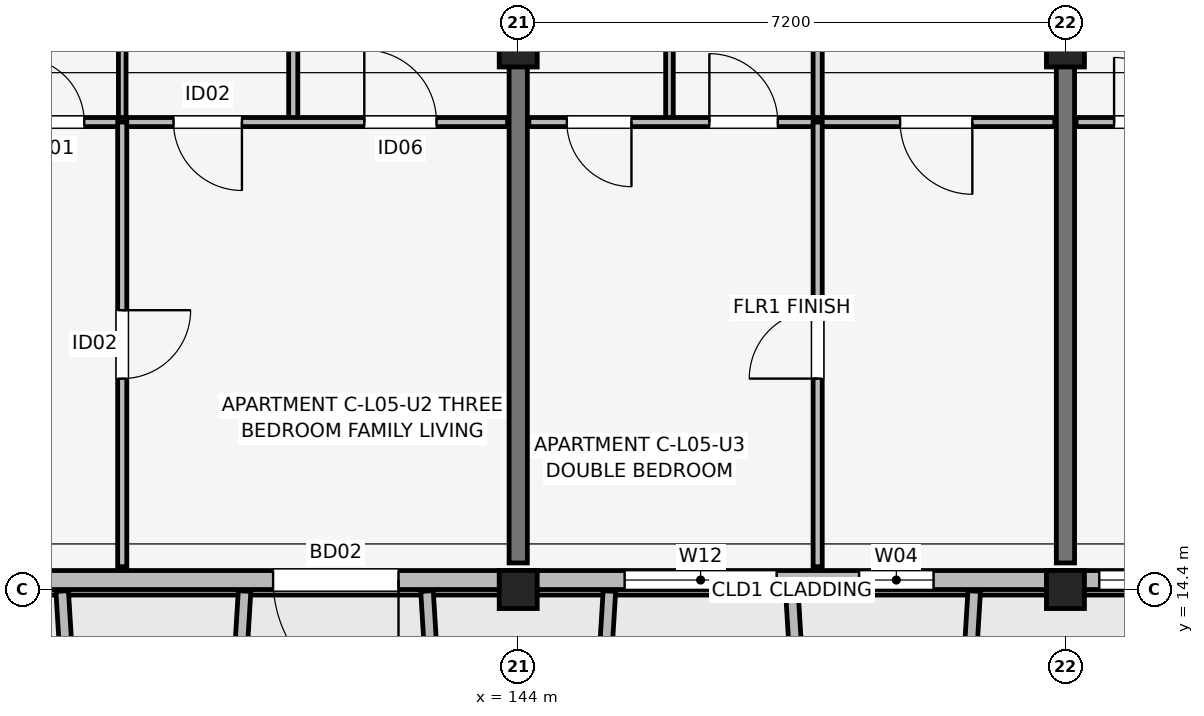
"""IFC4 building model, lengths in metres.
Left out: names, types, materials, properties, quantities, classifications, styles, units other than length and angle.
Written with IfcOpenShell. Run it as: python <this file> out.ifc"""

import sys

from ifc_helpers import new_model, si_unit, direction, frame, frame_2d, origin, origin_2d, place, context, subcontext, project, spatial, rectangle, extrude, element, fill, save


model = new_model("IFC4")
c1 = context("Model", 3, precision=1e-05, world=origin(), true_north=direction((0.0, 1.0)))
c2 = subcontext(c1, "Body", "Model", "MODEL_VIEW")
j1 = project(units=[si_unit("LENGTHUNIT", "METRE"), si_unit("PLANEANGLEUNIT", "RADIAN")], contexts=[c1])
p1 = place(None, origin())
s1 = spatial("IfcSite", under=j1, at=p1, CompositionType="ELEMENT")
p2 = place(p1, origin())
s2 = spatial("IfcBuilding", under=s1, at=p2, CompositionType="ELEMENT")
p3 = place(p2, frame((0.0, 0.0, 18.15)))
s3 = spatial("IfcBuildingStorey", under=s2, at=p3, CompositionType="ELEMENT", Elevation=18.15)
p4 = place(p3, frame((144.0, 14.4, 0.0), z_axis=(0.0, 0.0, 1.0), x_axis=(1.0, 0.0, 0.0)))
e1 = element("IfcColumn", 1, at=p4, inside=s3, PredefinedType="COLUMN", context=c2, shape_type="SweptSolid", body=[
    extrude(rectangle(XDim=0.5, YDim=0.5, at=origin_2d()), origin(), (0.0, 0.0, 1.0), 3.15),
])
p5 = place(p3, frame((144.0, 21.6, 0.0), z_axis=(0.0, 0.0, 1.0), x_axis=(1.0, 0.0, 0.0)))
e2 = element("IfcColumn", 2, at=p5, inside=s3, PredefinedType="COLUMN", context=c2, shape_type="SweptSolid", body=[
    extrude(rectangle(XDim=0.5, YDim=0.65, at=origin_2d()), origin(), (0.0, 0.0, 1.0), 3.15),
])
p6 = place(p3, frame((151.2, 14.4, 0.0), z_axis=(0.0, 0.0, 1.0), x_axis=(1.0, 0.0, 0.0)))
e3 = element("IfcColumn", 3, at=p6, inside=s3, PredefinedType="COLUMN", context=c2, shape_type="SweptSolid", body=[
    extrude(rectangle(XDim=0.5, YDim=0.5, at=origin_2d()), origin(), (0.0, 0.0, 1.0), 3.15),
])
p7 = place(p3, frame((151.2, 21.6, 0.0), z_axis=(0.0, 0.0, 1.0), x_axis=(1.0, 0.0, 0.0)))
e4 = element("IfcColumn", 4, at=p7, inside=s3, PredefinedType="COLUMN", context=c2, shape_type="SweptSolid", body=[
    extrude(rectangle(XDim=0.5, YDim=0.65, at=origin_2d()), origin(), (0.0, 0.0, 1.0), 3.15),
])
for number, where, z_axis, x_axis in (
    (5, (144.0, 14.75, 0.0), (0.0, 0.0, 1.0), (0.0, 1.0, 0.0)),
    (6, (151.2, 14.75, 0.0), (0.0, 0.0, 1.0), (0.0, 1.0, 0.0)),
):
    element("IfcWall", number, at=place(p3, frame(where, z_axis=z_axis, x_axis=x_axis)), inside=s3, PredefinedType="SHEAR", context=c2, shape_type="SweptSolid", body=[
        extrude(rectangle(XDim=9.4, YDim=0.24, at=frame_2d((4.7, 0.0))), origin(), (0.0, 0.0, 1.0), 3.15),
    ])
p8 = place(p3, frame((132.6, 14.525, 0.0), z_axis=(0.0, 0.0, 1.0), x_axis=(1.0, 0.0, 0.0)))
e7 = element("IfcWall", 7, at=p8, inside=s3, PredefinedType="SOLIDWALL", context=c2, shape_type="SweptSolid", body=[
    extrude(rectangle(XDim=30.0, YDim=0.25, at=frame_2d((15.0, 0.0))), origin(), (0.0, 0.0, 1.0), 2.43),
])
p9 = place(p8, frame((9.825, 0.0, 0.0), z_axis=(0.0, 0.0, 1.0), x_axis=(-1.0, 0.0, 0.0)))
e8 = element("IfcOpeningElement", 8, at=p9, cuts=e7, PredefinedType="OPENING", context=c2, shape_type="SweptSolid", body=[
    extrude(rectangle(XDim=1.65, YDim=2.15, at=frame_2d((0.825, 1.075))), frame((0.0, 0.135, 0.0), z_axis=(0.0, -1.0, 0.0), x_axis=(1.0, 0.0, 0.0)), (0.0, 0.0, 1.0), 0.27),
])
p10 = place(p8, frame((24.15, 0.0, 0.0), z_axis=(0.0, 0.0, 1.0), x_axis=(-1.0, 0.0, 0.0)))
e9 = element("IfcOpeningElement", 9, at=p10, cuts=e7, PredefinedType="OPENING", context=c2, shape_type="SweptSolid", body=[
    extrude(rectangle(XDim=1.5, YDim=2.15, at=frame_2d((0.75, 1.075))), frame((0.0, 0.135, 0.0), z_axis=(0.0, -1.0, 0.0), x_axis=(1.0, 0.0, 0.0)), (0.0, 0.0, 1.0), 0.27),
])
p11 = place(p8, frame((0.77, 0.0, 0.7)))
e10 = element("IfcOpeningElement", 10, at=p11, cuts=e7, PredefinedType="OPENING", context=c2, shape_type="SweptSolid", body=[
    extrude(rectangle(XDim=1.46, YDim=1.55, at=frame_2d((0.73, 0.775))), frame((0.0, 0.135, 0.0), z_axis=(0.0, -1.0, 0.0), x_axis=(1.0, 0.0, 0.0)), (0.0, 0.0, 1.0), 0.27),
])
p12 = place(p8, frame((3.155, 0.0, 0.75)))
e11 = element("IfcOpeningElement", 11, at=p12, cuts=e7, PredefinedType="OPENING", context=c2, shape_type="SweptSolid", body=[
    extrude(rectangle(XDim=0.6, YDim=1.25, at=frame_2d((0.3, 0.625))), frame((0.0, 0.135, 0.0), z_axis=(0.0, -1.0, 0.0), x_axis=(1.0, 0.0, 0.0)), (0.0, 0.0, 1.0), 0.27),
])
p13 = place(p8, frame((4.645, 0.0, 0.75)))
e12 = element("IfcOpeningElement", 12, at=p13, cuts=e7, PredefinedType="OPENING", context=c2, shape_type="SweptSolid", body=[
    extrude(rectangle(XDim=0.6, YDim=1.25, at=frame_2d((0.3, 0.625))), frame((0.0, 0.135, 0.0), z_axis=(0.0, -1.0, 0.0), x_axis=(1.0, 0.0, 0.0)), (0.0, 0.0, 1.0), 0.27),
])
p14 = place(p8, frame((12.8, 0.0, 0.67)))
e13 = element("IfcOpeningElement", 13, at=p14, cuts=e7, PredefinedType="OPENING", context=c2, shape_type="SweptSolid", body=[
    extrude(rectangle(XDim=2.0, YDim=1.65, at=frame_2d((1.0, 0.825))), frame((0.0, 0.135, 0.0), z_axis=(0.0, -1.0, 0.0), x_axis=(1.0, 0.0, 0.0)), (0.0, 0.0, 1.0), 0.27),
])
p15 = place(p8, frame((15.885, 0.0, 0.75)))
e14 = element("IfcOpeningElement", 14, at=p15, cuts=e7, PredefinedType="OPENING", context=c2, shape_type="SweptSolid", body=[
    extrude(rectangle(XDim=0.98, YDim=1.45, at=frame_2d((0.49, 0.725))), frame((0.0, 0.135, 0.0), z_axis=(0.0, -1.0, 0.0), x_axis=(1.0, 0.0, 0.0)), (0.0, 0.0, 1.0), 0.27),
])
p16 = place(p8, frame((19.045, 0.0, 0.75)))
e15 = element("IfcOpeningElement", 15, at=p16, cuts=e7, PredefinedType="OPENING", context=c2, shape_type="SweptSolid", body=[
    extrude(rectangle(XDim=0.6, YDim=1.25, at=frame_2d((0.3, 0.625))), frame((0.0, 0.135, 0.0), z_axis=(0.0, -1.0, 0.0), x_axis=(1.0, 0.0, 0.0)), (0.0, 0.0, 1.0), 0.27),
])
p17 = place(p8, frame((26.245, 0.0, 0.75)))
e16 = element("IfcOpeningElement", 16, at=p17, cuts=e7, PredefinedType="OPENING", context=c2, shape_type="SweptSolid", body=[
    extrude(rectangle(XDim=0.6, YDim=1.25, at=frame_2d((0.3, 0.625))), frame((0.0, 0.135, 0.0), z_axis=(0.0, -1.0, 0.0), x_axis=(1.0, 0.0, 0.0)), (0.0, 0.0, 1.0), 0.27),
])
p18 = place(p8, frame((28.02, 0.0, 0.75)))
e17 = element("IfcOpeningElement", 17, at=p18, cuts=e7, PredefinedType="OPENING", context=c2, shape_type="SweptSolid", body=[
    extrude(rectangle(XDim=1.22, YDim=1.5, at=frame_2d((0.61, 0.75))), frame((0.0, 0.135, 0.0), z_axis=(0.0, -1.0, 0.0), x_axis=(1.0, 0.0, 0.0)), (0.0, 0.0, 1.0), 0.27),
])
for number, where, z_axis, x_axis in (
    (18, (138.0, 14.38, 0.0), (0.0, 0.0, 1.0), (0.061, -0.998, 0.0)),
    (19, (140.4, 14.38, 0.0), (0.0, 0.0, 1.0), (-0.061, -0.998, 0.0)),
    (20, (142.8, 14.38, 0.0), (0.0, 0.0, 1.0), (0.061, -0.998, 0.0)),
):
    element("IfcWall", number, at=place(p3, frame(where, z_axis=z_axis, x_axis=x_axis)), inside=s3, PredefinedType="ELEMENTEDWALL", context=c2, shape_type="SweptSolid", body=[
        extrude(rectangle(XDim=1.964, YDim=0.165, at=frame_2d((0.982, 0.0))), origin(), (0.0, 0.0, 1.0), 2.55),
    ])
for number, where, z_axis, x_axis in (
    (21, (145.2, 14.38, 0.0), (0.0, 0.0, 1.0), (-0.061, -0.998, 0.0)),
    (22, (147.6, 14.38, 0.0), (0.0, 0.0, 1.0), (0.061, -0.998, 0.0)),
    (23, (150.0, 14.38, 0.0), (0.0, 0.0, 1.0), (-0.061, -0.998, 0.0)),
):
    element("IfcWall", number, at=place(p3, frame(where, z_axis=z_axis, x_axis=x_axis)), inside=s3, PredefinedType="ELEMENTEDWALL", context=c2, shape_type="SweptSolid", body=[
        extrude(rectangle(XDim=1.964, YDim=0.165, at=frame_2d((0.982, 0.0))), origin(), (0.0, 0.0, 1.0), 2.45),
    ])
p19 = place(p3, frame((138.79, 20.55, 0.0), z_axis=(0.0, 0.0, 1.0), x_axis=(0.0, 1.0, 0.0)))
e24 = element("IfcWall", 24, at=p19, inside=s3, PredefinedType="PARTITIONING", context=c2, shape_type="SweptSolid", body=[
    extrude(rectangle(XDim=3.75, YDim=0.1, at=frame_2d((1.875, 0.0))), origin(), (0.0, 0.0, 1.0), 2.375),
])
p20 = place(p3, frame((141.04, 20.55, 0.0), z_axis=(0.0, 0.0, 1.0), x_axis=(0.0, 1.0, 0.0)))
e25 = element("IfcWall", 25, at=p20, inside=s3, PredefinedType="PARTITIONING", context=c2, shape_type="SweptSolid", body=[
    extrude(rectangle(XDim=3.75, YDim=0.12, at=frame_2d((1.875, 0.0))), origin(), (0.0, 0.0, 1.0), 2.375),
])
p21 = place(p3, frame((136.94, 20.55, 0.0), z_axis=(0.0, 0.0, 1.0), x_axis=(1.0, 0.0, 0.0)))
e26 = element("IfcWall", 26, at=p21, inside=s3, PredefinedType="PARTITIONING", context=c2, shape_type="SweptSolid", body=[
    extrude(rectangle(XDim=6.92, YDim=0.12, at=frame_2d((3.46, 0.0))), origin(), (0.0, 0.0, 1.0), 2.38),
])
p22 = place(p21, frame((0.5, 0.0, 0.0)))
e27 = element("IfcOpeningElement", 27, at=p22, cuts=e26, PredefinedType="OPENING", context=c2, shape_type="SweptSolid", body=[
    extrude(rectangle(XDim=0.85, YDim=2.08, at=frame_2d((0.425, 1.04))), frame((0.0, 0.07, 0.0), z_axis=(0.0, -1.0, 0.0), x_axis=(1.0, 0.0, 0.0)), (0.0, 0.0, 1.0), 0.14),
])
p23 = place(p21, frame((3.425, 0.0, 0.0), z_axis=(0.0, 0.0, 1.0), x_axis=(-1.0, 0.0, 0.0)))
e28 = element("IfcOpeningElement", 28, at=p23, cuts=e26, PredefinedType="OPENING", context=c2, shape_type="SweptSolid", body=[
    extrude(rectangle(XDim=0.9, YDim=2.08, at=frame_2d((0.45, 1.04))), frame((0.0, 0.07, 0.0), z_axis=(0.0, -1.0, 0.0), x_axis=(1.0, 0.0, 0.0)), (0.0, 0.0, 1.0), 0.14),
])
p24 = place(p21, frame((5.035, 0.0, 0.0)))
e29 = element("IfcOpeningElement", 29, at=p24, cuts=e26, PredefinedType="OPENING", context=c2, shape_type="SweptSolid", body=[
    extrude(rectangle(XDim=0.95, YDim=2.08, at=frame_2d((0.475, 1.04))), frame((0.0, 0.07, 0.0), z_axis=(0.0, -1.0, 0.0), x_axis=(1.0, 0.0, 0.0)), (0.0, 0.0, 1.0), 0.14),
])
p25 = place(p3, frame((138.79, 14.7, 0.0), z_axis=(0.0, 0.0, 1.0), x_axis=(0.0, 1.0, 0.0)))
e30 = element("IfcWall", 30, at=p25, inside=s3, PredefinedType="PARTITIONING", context=c2, shape_type="SweptSolid", body=[
    extrude(rectangle(XDim=5.85, YDim=0.12, at=frame_2d((2.925, 0.0))), origin(), (0.0, 0.0, 1.0), 2.38),
])
p26 = place(p25, frame((3.375, 0.0, 0.0), z_axis=(0.0, 0.0, 1.0), x_axis=(-1.0, 0.0, 0.0)))
e31 = element("IfcOpeningElement", 31, at=p26, cuts=e30, PredefinedType="OPENING", context=c2, shape_type="SweptSolid", body=[
    extrude(rectangle(XDim=0.9, YDim=2.08, at=frame_2d((0.45, 1.04))), frame((0.0, 0.07, 0.0), z_axis=(0.0, -1.0, 0.0), x_axis=(1.0, 0.0, 0.0)), (0.0, 0.0, 1.0), 0.14),
])
p27 = place(p3, frame((145.99, 20.55, 0.0), z_axis=(0.0, 0.0, 1.0), x_axis=(0.0, 1.0, 0.0)))
e32 = element("IfcWall", 32, at=p27, inside=s3, PredefinedType="PARTITIONING", context=c2, shape_type="SweptSolid", body=[
    extrude(rectangle(XDim=3.75, YDim=0.1, at=frame_2d((1.875, 0.0))), origin(), (0.0, 0.0, 1.0), 2.375),
])
p28 = place(p3, frame((147.94, 20.55, 0.0), z_axis=(0.0, 0.0, 1.0), x_axis=(0.0, 1.0, 0.0)))
e33 = element("IfcWall", 33, at=p28, inside=s3, PredefinedType="PARTITIONING", context=c2, shape_type="SweptSolid", body=[
    extrude(rectangle(XDim=3.75, YDim=0.12, at=frame_2d((1.875, 0.0))), origin(), (0.0, 0.0, 1.0), 2.375),
])
p29 = place(p3, frame((144.14, 20.55, 0.0), z_axis=(0.0, 0.0, 1.0), x_axis=(1.0, 0.0, 0.0)))
e34 = element("IfcWall", 34, at=p29, inside=s3, PredefinedType="PARTITIONING", context=c2, shape_type="SweptSolid", body=[
    extrude(rectangle(XDim=6.92, YDim=0.12, at=frame_2d((3.46, 0.0))), origin(), (0.0, 0.0, 1.0), 2.38),
])
p30 = place(p29, frame((1.35, 0.0, 0.0), z_axis=(0.0, 0.0, 1.0), x_axis=(-1.0, 0.0, 0.0)))
e35 = element("IfcOpeningElement", 35, at=p30, cuts=e34, PredefinedType="OPENING", context=c2, shape_type="SweptSolid", body=[
    extrude(rectangle(XDim=0.85, YDim=2.08, at=frame_2d((0.425, 1.04))), frame((0.0, 0.07, 0.0), z_axis=(0.0, -1.0, 0.0), x_axis=(1.0, 0.0, 0.0)), (0.0, 0.0, 1.0), 0.14),
])
p31 = place(p29, frame((2.375, 0.0, 0.0)))
e36 = element("IfcOpeningElement", 36, at=p31, cuts=e34, PredefinedType="OPENING", context=c2, shape_type="SweptSolid", body=[
    extrude(rectangle(XDim=0.9, YDim=2.08, at=frame_2d((0.45, 1.04))), frame((0.0, 0.07, 0.0), z_axis=(0.0, -1.0, 0.0), x_axis=(1.0, 0.0, 0.0)), (0.0, 0.0, 1.0), 0.14),
])
p32 = place(p29, frame((5.835, 0.0, 0.0), z_axis=(0.0, 0.0, 1.0), x_axis=(-1.0, 0.0, 0.0)))
e37 = element("IfcOpeningElement", 37, at=p32, cuts=e34, PredefinedType="OPENING", context=c2, shape_type="SweptSolid", body=[
    extrude(rectangle(XDim=0.95, YDim=2.08, at=frame_2d((0.475, 1.04))), frame((0.0, 0.07, 0.0), z_axis=(0.0, -1.0, 0.0), x_axis=(1.0, 0.0, 0.0)), (0.0, 0.0, 1.0), 0.14),
])
p33 = place(p3, frame((147.94, 14.7, 0.0), z_axis=(0.0, 0.0, 1.0), x_axis=(0.0, 1.0, 0.0)))
e38 = element("IfcWall", 38, at=p33, inside=s3, PredefinedType="PARTITIONING", context=c2, shape_type="SweptSolid", body=[
    extrude(rectangle(XDim=5.85, YDim=0.12, at=frame_2d((2.925, 0.0))), origin(), (0.0, 0.0, 1.0), 2.38),
])
p34 = place(p33, frame((2.475, 0.0, 0.0)))
e39 = element("IfcOpeningElement", 39, at=p34, cuts=e38, PredefinedType="OPENING", context=c2, shape_type="SweptSolid", body=[
    extrude(rectangle(XDim=0.9, YDim=2.08, at=frame_2d((0.45, 1.04))), frame((0.0, 0.07, 0.0), z_axis=(0.0, -1.0, 0.0), x_axis=(1.0, 0.0, 0.0)), (0.0, 0.0, 1.0), 0.14),
])
p35 = place(p3, frame((151.34, 20.55, 0.0), z_axis=(0.0, 0.0, 1.0), x_axis=(1.0, 0.0, 0.0)))
e40 = element("IfcWall", 40, at=p35, inside=s3, PredefinedType="PARTITIONING", context=c2, shape_type="SweptSolid", body=[
    extrude(rectangle(XDim=6.92, YDim=0.12, at=frame_2d((3.46, 0.0))), origin(), (0.0, 0.0, 1.0), 2.38),
])
p36 = place(p35, frame((0.5, 0.0, 0.0)))
e41 = element("IfcOpeningElement", 41, at=p36, cuts=e40, PredefinedType="OPENING", context=c2, shape_type="SweptSolid", body=[
    extrude(rectangle(XDim=0.85, YDim=2.08, at=frame_2d((0.425, 1.04))), frame((0.0, 0.07, 0.0), z_axis=(0.0, -1.0, 0.0), x_axis=(1.0, 0.0, 0.0)), (0.0, 0.0, 1.0), 0.14),
])
p37 = place(p35, frame((3.425, 0.0, 0.0), z_axis=(0.0, 0.0, 1.0), x_axis=(-1.0, 0.0, 0.0)))
e42 = element("IfcOpeningElement", 42, at=p37, cuts=e40, PredefinedType="OPENING", context=c2, shape_type="SweptSolid", body=[
    extrude(rectangle(XDim=0.9, YDim=2.08, at=frame_2d((0.45, 1.04))), frame((0.0, 0.07, 0.0), z_axis=(0.0, -1.0, 0.0), x_axis=(1.0, 0.0, 0.0)), (0.0, 0.0, 1.0), 0.14),
])
p38 = place(p35, frame((5.035, 0.0, 0.0)))
e43 = element("IfcOpeningElement", 43, at=p38, cuts=e40, PredefinedType="OPENING", context=c2, shape_type="SweptSolid", body=[
    extrude(rectangle(XDim=0.95, YDim=2.08, at=frame_2d((0.475, 1.04))), frame((0.0, 0.07, 0.0), z_axis=(0.0, -1.0, 0.0), x_axis=(1.0, 0.0, 0.0)), (0.0, 0.0, 1.0), 0.14),
])
p39 = place(p9, origin())
e44 = element("IfcDoor", 44, at=p39, inside=s3, OperationType="SINGLE_SWING_RIGHT", PredefinedType="DOOR", context=c2, shape_type="SweptSolid", body=[
    extrude(rectangle(XDim=1.65, YDim=2.15, at=frame_2d((0.825, 1.075))), frame((0.0, 0.025, 0.0), z_axis=(0.0, -1.0, 0.0), x_axis=(1.0, 0.0, 0.0)), (0.0, 0.0, 1.0), 0.05),
])
fill(e8, e44)
p40 = place(p14, origin())
e45 = element("IfcWindow", 45, at=p40, inside=s3, PartitioningType="SINGLE_PANEL", PredefinedType="WINDOW", context=c2, shape_type="SweptSolid", body=[
    extrude(rectangle(XDim=2.0, YDim=1.65, at=frame_2d((1.0, 0.825))), frame((0.0, 0.03, 0.0), z_axis=(0.0, -1.0, 0.0), x_axis=(1.0, 0.0, 0.0)), (0.0, 0.0, 1.0), 0.06),
])
fill(e13, e45)
p41 = place(p15, origin())
e46 = element("IfcWindow", 46, at=p41, inside=s3, PartitioningType="SINGLE_PANEL", PredefinedType="WINDOW", context=c2, shape_type="SweptSolid", body=[
    extrude(rectangle(XDim=0.98, YDim=1.45, at=frame_2d((0.49, 0.725))), frame((0.0, 0.03, 0.0), z_axis=(0.0, -1.0, 0.0), x_axis=(1.0, 0.0, 0.0)), (0.0, 0.0, 1.0), 0.06),
])
fill(e14, e46)
p42 = place(p16, origin())
e47 = element("IfcWindow", 47, at=p42, inside=s3, PartitioningType="SINGLE_PANEL", PredefinedType="WINDOW", context=c2, shape_type="SweptSolid", body=[
    extrude(rectangle(XDim=0.6, YDim=1.25, at=frame_2d((0.3, 0.625))), frame((0.0, 0.03, 0.0), z_axis=(0.0, -1.0, 0.0), x_axis=(1.0, 0.0, 0.0)), (0.0, 0.0, 1.0), 0.06),
])
fill(e15, e47)
p43 = place(p22, origin())
e48 = element("IfcDoor", 48, at=p43, inside=s3, OperationType="SINGLE_SWING_LEFT", PredefinedType="DOOR", context=c2, shape_type="SweptSolid", body=[
    extrude(rectangle(XDim=0.85, YDim=2.08, at=frame_2d((0.425, 1.04))), frame((0.0, 0.025, 0.0), z_axis=(0.0, -1.0, 0.0), x_axis=(1.0, 0.0, 0.0)), (0.0, 0.0, 1.0), 0.05),
])
fill(e27, e48)
p44 = place(p23, origin())
e49 = element("IfcDoor", 49, at=p44, inside=s3, OperationType="SINGLE_SWING_RIGHT", PredefinedType="DOOR", context=c2, shape_type="SweptSolid", body=[
    extrude(rectangle(XDim=0.9, YDim=2.08, at=frame_2d((0.45, 1.04))), frame((0.0, 0.025, 0.0), z_axis=(0.0, -1.0, 0.0), x_axis=(1.0, 0.0, 0.0)), (0.0, 0.0, 1.0), 0.05),
])
fill(e28, e49)
p45 = place(p24, origin())
e50 = element("IfcDoor", 50, at=p45, inside=s3, OperationType="SINGLE_SWING_LEFT", PredefinedType="DOOR", context=c2, shape_type="SweptSolid", body=[
    extrude(rectangle(XDim=0.95, YDim=2.08, at=frame_2d((0.475, 1.04))), frame((0.0, 0.025, 0.0), z_axis=(0.0, -1.0, 0.0), x_axis=(1.0, 0.0, 0.0)), (0.0, 0.0, 1.0), 0.05),
])
fill(e29, e50)
p46 = place(p26, origin())
e51 = element("IfcDoor", 51, at=p46, inside=s3, OperationType="SINGLE_SWING_RIGHT", PredefinedType="DOOR", context=c2, shape_type="SweptSolid", body=[
    extrude(rectangle(XDim=0.9, YDim=2.08, at=frame_2d((0.45, 1.04))), frame((0.0, 0.025, 0.0), z_axis=(0.0, -1.0, 0.0), x_axis=(1.0, 0.0, 0.0)), (0.0, 0.0, 1.0), 0.05),
])
fill(e31, e51)
p47 = place(p30, origin())
e52 = element("IfcDoor", 52, at=p47, inside=s3, OperationType="SINGLE_SWING_RIGHT", PredefinedType="DOOR", context=c2, shape_type="SweptSolid", body=[
    extrude(rectangle(XDim=0.85, YDim=2.08, at=frame_2d((0.425, 1.04))), frame((0.0, 0.025, 0.0), z_axis=(0.0, -1.0, 0.0), x_axis=(1.0, 0.0, 0.0)), (0.0, 0.0, 1.0), 0.05),
])
fill(e35, e52)
p48 = place(p31, origin())
e53 = element("IfcDoor", 53, at=p48, inside=s3, OperationType="SINGLE_SWING_LEFT", PredefinedType="DOOR", context=c2, shape_type="SweptSolid", body=[
    extrude(rectangle(XDim=0.9, YDim=2.08, at=frame_2d((0.45, 1.04))), frame((0.0, 0.025, 0.0), z_axis=(0.0, -1.0, 0.0), x_axis=(1.0, 0.0, 0.0)), (0.0, 0.0, 1.0), 0.05),
])
fill(e36, e53)
p49 = place(p32, origin())
e54 = element("IfcDoor", 54, at=p49, inside=s3, OperationType="SINGLE_SWING_RIGHT", PredefinedType="DOOR", context=c2, shape_type="SweptSolid", body=[
    extrude(rectangle(XDim=0.95, YDim=2.08, at=frame_2d((0.475, 1.04))), frame((0.0, 0.025, 0.0), z_axis=(0.0, -1.0, 0.0), x_axis=(1.0, 0.0, 0.0)), (0.0, 0.0, 1.0), 0.05),
])
fill(e37, e54)
p50 = place(p34, origin())
e55 = element("IfcDoor", 55, at=p50, inside=s3, OperationType="SINGLE_SWING_LEFT", PredefinedType="DOOR", context=c2, shape_type="SweptSolid", body=[
    extrude(rectangle(XDim=0.9, YDim=2.08, at=frame_2d((0.45, 1.04))), frame((0.0, 0.025, 0.0), z_axis=(0.0, -1.0, 0.0), x_axis=(1.0, 0.0, 0.0)), (0.0, 0.0, 1.0), 0.05),
])
fill(e39, e55)
p51 = place(p36, origin())
e56 = element("IfcDoor", 56, at=p51, inside=s3, OperationType="SINGLE_SWING_LEFT", PredefinedType="DOOR", context=c2, shape_type="SweptSolid", body=[
    extrude(rectangle(XDim=0.85, YDim=2.08, at=frame_2d((0.425, 1.04))), frame((0.0, 0.025, 0.0), z_axis=(0.0, -1.0, 0.0), x_axis=(1.0, 0.0, 0.0)), (0.0, 0.0, 1.0), 0.05),
])
fill(e41, e56)
save(model, sys.argv[1])
